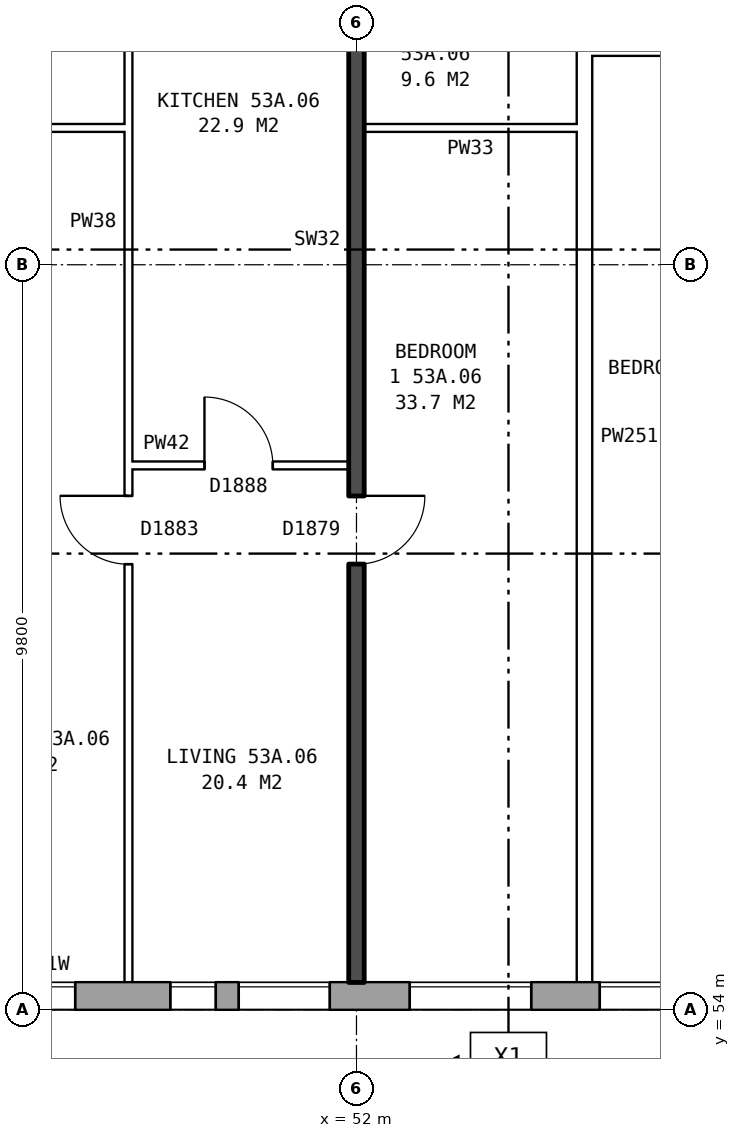
"""IFC4 building model, lengths in metres.
Left out: names, types, materials, properties, quantities, classifications, styles, units other than length and angle.
Written with IfcOpenShell. Run it as: python <this file> out.ifc"""

import sys

from ifc_helpers import new_model, si_unit, direction, frame, frame_2d, origin, place, context, subcontext, project, spatial, rectangle, extrude, element, fill, save


model = new_model("IFC4")
c1 = context("Model", 3, precision=1e-05, world=origin(), true_north=direction((0.0, 1.0)))
c2 = subcontext(c1, "Body", "Model", "MODEL_VIEW")
j1 = project(units=[si_unit("LENGTHUNIT", "METRE"), si_unit("PLANEANGLEUNIT", "RADIAN")], contexts=[c1])
p1 = place(None, origin())
s1 = spatial("IfcSite", under=j1, at=p1, CompositionType="ELEMENT")
p2 = place(p1, origin())
s2 = spatial("IfcBuilding", under=s1, at=p2, CompositionType="ELEMENT")
p3 = place(p2, frame((0.0, 0.0, 188.2)))
s3 = spatial("IfcBuildingStorey", under=s2, at=p3, CompositionType="ELEMENT", Elevation=188.2)
p4 = place(p3, frame((33.325, 54.18, 0.0), z_axis=(0.0, 0.0, 1.0), x_axis=(1.0, 0.0, 0.0)))
e1 = element("IfcWall", 1, at=p4, inside=s3, PredefinedType="STANDARD", context=c2, shape_type="SweptSolid", body=[
    extrude(rectangle(XDim=39.601, YDim=0.36, at=frame_2d((19.8, 0.0))), origin(), (0.0, 0.0, 1.0), 2.85),
])
p5 = place(p4, frame((1.375, 0.0, 0.8)))
e2 = element("IfcOpeningElement", 2, at=p5, cuts=e1, PredefinedType="OPENING", context=c2, shape_type="SweptSolid", body=[
    extrude(rectangle(XDim=1.6, YDim=1.8, at=frame_2d((0.8, 0.9))), frame((0.0, 0.19, 0.0), z_axis=(0.0, -1.0, 0.0), x_axis=(1.0, 0.0, 0.0)), (0.0, 0.0, 1.0), 0.38),
])
p6 = place(p4, frame((4.375, 0.0, 0.8)))
e3 = element("IfcOpeningElement", 3, at=p6, cuts=e1, PredefinedType="OPENING", context=c2, shape_type="SweptSolid", body=[
    extrude(rectangle(XDim=1.6, YDim=1.8, at=frame_2d((0.8, 0.9))), frame((0.0, 0.19, 0.0), z_axis=(0.0, -1.0, 0.0), x_axis=(1.0, 0.0, 0.0)), (0.0, 0.0, 1.0), 0.38),
])
p7 = place(p4, frame((7.375, 0.0, 0.8)))
e4 = element("IfcOpeningElement", 4, at=p7, cuts=e1, PredefinedType="OPENING", context=c2, shape_type="SweptSolid", body=[
    extrude(rectangle(XDim=1.6, YDim=1.8, at=frame_2d((0.8, 0.9))), frame((0.0, 0.19, 0.0), z_axis=(0.0, -1.0, 0.0), x_axis=(1.0, 0.0, 0.0)), (0.0, 0.0, 1.0), 0.38),
])
p8 = place(p4, frame((10.375, 0.0, 0.8)))
e5 = element("IfcOpeningElement", 5, at=p8, cuts=e1, PredefinedType="OPENING", context=c2, shape_type="SweptSolid", body=[
    extrude(rectangle(XDim=1.6, YDim=1.8, at=frame_2d((0.8, 0.9))), frame((0.0, 0.19, 0.0), z_axis=(0.0, -1.0, 0.0), x_axis=(1.0, 0.0, 0.0)), (0.0, 0.0, 1.0), 0.38),
])
p9 = place(p4, frame((12.875, 0.0, 0.8)))
e6 = element("IfcOpeningElement", 6, at=p9, cuts=e1, PredefinedType="OPENING", context=c2, shape_type="SweptSolid", body=[
    extrude(rectangle(XDim=1.2, YDim=1.8, at=frame_2d((0.6, 0.9))), frame((0.0, 0.19, 0.0), z_axis=(0.0, -1.0, 0.0), x_axis=(1.0, 0.0, 0.0)), (0.0, 0.0, 1.0), 0.38),
])
p10 = place(p4, frame((16.225, 0.0, 0.8)))
e7 = element("IfcOpeningElement", 7, at=p10, cuts=e1, PredefinedType="OPENING", context=c2, shape_type="SweptSolid", body=[
    extrude(rectangle(XDim=0.6, YDim=0.9, at=frame_2d((0.3, 0.45))), frame((0.0, 0.19, 0.0), z_axis=(0.0, -1.0, 0.0), x_axis=(1.0, 0.0, 0.0)), (0.0, 0.0, 1.0), 0.38),
])
p11 = place(p4, frame((19.375, 0.0, 0.8)))
e8 = element("IfcOpeningElement", 8, at=p11, cuts=e1, PredefinedType="OPENING", context=c2, shape_type="SweptSolid", body=[
    extrude(rectangle(XDim=1.6, YDim=1.8, at=frame_2d((0.8, 0.9))), frame((0.0, 0.19, 0.0), z_axis=(0.0, -1.0, 0.0), x_axis=(1.0, 0.0, 0.0)), (0.0, 0.0, 1.0), 0.38),
])
p12 = place(p4, frame((21.875, 0.0, 0.15)))
e9 = element("IfcOpeningElement", 9, at=p12, cuts=e1, PredefinedType="OPENING", context=c2, shape_type="SweptSolid", body=[
    extrude(rectangle(XDim=1.2, YDim=1.8, at=frame_2d((0.6, 0.9))), frame((0.0, 0.19, 0.0), z_axis=(0.0, -1.0, 0.0), x_axis=(1.0, 0.0, 0.0)), (0.0, 0.0, 1.0), 0.38),
])
p13 = place(p4, frame((25.375, 0.0, 0.8)))
e10 = element("IfcOpeningElement", 10, at=p13, cuts=e1, PredefinedType="OPENING", context=c2, shape_type="SweptSolid", body=[
    extrude(rectangle(XDim=1.6, YDim=1.8, at=frame_2d((0.8, 0.9))), frame((0.0, 0.19, 0.0), z_axis=(0.0, -1.0, 0.0), x_axis=(1.0, 0.0, 0.0)), (0.0, 0.0, 1.0), 0.38),
])
p14 = place(p4, frame((28.375, 0.0, 0.8)))
e11 = element("IfcOpeningElement", 11, at=p14, cuts=e1, PredefinedType="OPENING", context=c2, shape_type="SweptSolid", body=[
    extrude(rectangle(XDim=1.6, YDim=1.8, at=frame_2d((0.8, 0.9))), frame((0.0, 0.19, 0.0), z_axis=(0.0, -1.0, 0.0), x_axis=(1.0, 0.0, 0.0)), (0.0, 0.0, 1.0), 0.38),
])
p15 = place(p4, frame((31.375, 0.0, 0.8)))
e12 = element("IfcOpeningElement", 12, at=p15, cuts=e1, PredefinedType="OPENING", context=c2, shape_type="SweptSolid", body=[
    extrude(rectangle(XDim=1.6, YDim=1.8, at=frame_2d((0.8, 0.9))), frame((0.0, 0.19, 0.0), z_axis=(0.0, -1.0, 0.0), x_axis=(1.0, 0.0, 0.0)), (0.0, 0.0, 1.0), 0.38),
])
p16 = place(p4, frame((34.375, 0.0, 0.8)))
e13 = element("IfcOpeningElement", 13, at=p16, cuts=e1, PredefinedType="OPENING", context=c2, shape_type="SweptSolid", body=[
    extrude(rectangle(XDim=1.6, YDim=1.8, at=frame_2d((0.8, 0.9))), frame((0.0, 0.19, 0.0), z_axis=(0.0, -1.0, 0.0), x_axis=(1.0, 0.0, 0.0)), (0.0, 0.0, 1.0), 0.38),
])
p17 = place(p4, frame((37.375, 0.0, 0.8)))
e14 = element("IfcOpeningElement", 14, at=p17, cuts=e1, PredefinedType="OPENING", context=c2, shape_type="SweptSolid", body=[
    extrude(rectangle(XDim=1.6, YDim=1.8, at=frame_2d((0.8, 0.9))), frame((0.0, 0.19, 0.0), z_axis=(0.0, -1.0, 0.0), x_axis=(1.0, 0.0, 0.0)), (0.0, 0.0, 1.0), 0.38),
])
p18 = place(p4, frame((14.375, 0.0, 1.6)))
e15 = element("IfcOpeningElement", 15, at=p18, cuts=e1, PredefinedType="OPENING", context=c2, shape_type="SweptSolid", body=[
    extrude(rectangle(XDim=0.6, YDim=0.9, at=frame_2d((0.3, 0.45))), frame((0.0, 0.19, 0.0), z_axis=(0.0, -1.0, 0.0), x_axis=(1.0, 0.0, 0.0)), (0.0, 0.0, 1.0), 0.38),
])
p19 = place(p4, frame((17.125, 0.0, 0.8)))
e16 = element("IfcOpeningElement", 16, at=p19, cuts=e1, PredefinedType="OPENING", context=c2, shape_type="SweptSolid", body=[
    extrude(rectangle(XDim=1.2, YDim=1.8, at=frame_2d((0.6, 0.9))), frame((0.0, 0.19, 0.0), z_axis=(0.0, -1.0, 0.0), x_axis=(1.0, 0.0, 0.0)), (0.0, 0.0, 1.0), 0.38),
])
p20 = place(p4, frame((23.375, 0.0, 0.15)))
e17 = element("IfcOpeningElement", 17, at=p20, cuts=e1, PredefinedType="OPENING", context=c2, shape_type="SweptSolid", body=[
    extrude(rectangle(XDim=0.6, YDim=0.9, at=frame_2d((0.3, 0.45))), frame((0.0, 0.19, 0.0), z_axis=(0.0, -1.0, 0.0), x_axis=(1.0, 0.0, 0.0)), (0.0, 0.0, 1.0), 0.38),
])
p21 = place(p3, frame((49.0, 61.16, 0.0), z_axis=(0.0, 0.0, 1.0), x_axis=(1.0, 0.0, 0.0)))
e18 = element("IfcWall", 18, at=p21, inside=s3, PredefinedType="PARTITIONING", context=c2, shape_type="SweptSolid", body=[
    extrude(rectangle(XDim=2.9, YDim=0.1, at=frame_2d((1.45, 0.0))), origin(), (0.0, 0.0, 1.0), 2.85),
])
p22 = place(p21, frame((1.0, 0.0, 0.0)))
e19 = element("IfcOpeningElement", 19, at=p22, cuts=e18, PredefinedType="OPENING", context=c2, shape_type="SweptSolid", body=[
    extrude(rectangle(XDim=0.9, YDim=2.1, at=frame_2d((0.45, 1.05))), frame((0.0, 0.06, 0.0), z_axis=(0.0, -1.0, 0.0), x_axis=(1.0, 0.0, 0.0)), (0.0, 0.0, 1.0), 0.12),
])
p23 = place(p3, frame((46.1, 65.6, 0.0), z_axis=(0.0, 0.0, 1.0), x_axis=(1.0, 0.0, 0.0)))
e20 = element("IfcWall", 20, at=p23, inside=s3, PredefinedType="PARTITIONING", context=c2, shape_type="SweptSolid", body=[
    extrude(rectangle(XDim=2.9, YDim=0.1, at=frame_2d((1.45, 0.0))), origin(), (0.0, 0.0, 1.0), 2.85),
])
for number, where, z_axis, x_axis in (
    (21, (52.1, 65.6, 0.0), (0.0, 0.0, 1.0), (1.0, 0.0, 0.0)),
    (22, (55.1, 66.6, 0.0), (0.0, 0.0, 1.0), (1.0, 0.0, 0.0)),
):
    element("IfcWall", number, at=place(p3, frame(where, z_axis=z_axis, x_axis=x_axis)), inside=s3, PredefinedType="PARTITIONING", context=c2, shape_type="SweptSolid", body=[
        extrude(rectangle(XDim=2.8, YDim=0.1, at=frame_2d((1.4, 0.0))), origin(), (0.0, 0.0, 1.0), 2.85),
    ])
p24 = place(p3, frame((49.0, 54.36, 0.0), z_axis=(0.0, 0.0, 1.0), x_axis=(0.0, 1.0, 0.0)))
e23 = element("IfcWall", 23, at=p24, inside=s3, PredefinedType="PARTITIONING", context=c2, shape_type="SweptSolid", body=[
    extrude(rectangle(XDim=14.34, YDim=0.1, at=frame_2d((7.17, 0.0))), origin(), (0.0, 0.0, 1.0), 2.85),
])
p25 = place(p24, frame((5.5, 0.0, 0.0)))
e24 = element("IfcOpeningElement", 24, at=p25, cuts=e23, PredefinedType="OPENING", context=c2, shape_type="SweptSolid", body=[
    extrude(rectangle(XDim=0.9, YDim=2.1, at=frame_2d((0.45, 1.05))), frame((0.0, 0.06, 0.0), z_axis=(0.0, -1.0, 0.0), x_axis=(1.0, 0.0, 0.0)), (0.0, 0.0, 1.0), 0.12),
])
p26 = place(p24, frame((13.04, 0.0, 0.0)))
e25 = element("IfcOpeningElement", 25, at=p26, cuts=e23, PredefinedType="OPENING", context=c2, shape_type="SweptSolid", body=[
    extrude(rectangle(XDim=0.9, YDim=2.1, at=frame_2d((0.45, 1.05))), frame((0.0, 0.06, 0.0), z_axis=(0.0, -1.0, 0.0), x_axis=(1.0, 0.0, 0.0)), (0.0, 0.0, 1.0), 0.12),
])
p27 = place(p3, frame((52.0, 54.36, 0.0), z_axis=(0.0, 0.0, 1.0), x_axis=(0.0, 1.0, 0.0)))
e26 = element("IfcWall", 26, at=p27, inside=s3, PredefinedType="SOLIDWALL", context=c2, shape_type="SweptSolid", body=[
    extrude(rectangle(XDim=14.44, YDim=0.2, at=frame_2d((7.22, 0.0))), origin(), (0.0, 0.0, 1.0), 2.85),
])
p28 = place(p27, frame((5.5, 0.0, 0.0)))
e27 = element("IfcOpeningElement", 27, at=p28, cuts=e26, PredefinedType="OPENING", context=c2, shape_type="SweptSolid", body=[
    extrude(rectangle(XDim=0.9, YDim=2.1, at=frame_2d((0.45, 1.05))), frame((0.0, 0.11, 0.0), z_axis=(0.0, -1.0, 0.0), x_axis=(1.0, 0.0, 0.0)), (0.0, 0.0, 1.0), 0.22),
])
p29 = place(p27, frame((13.14, 0.0, 0.0)))
e28 = element("IfcOpeningElement", 28, at=p29, cuts=e26, PredefinedType="OPENING", context=c2, shape_type="SweptSolid", body=[
    extrude(rectangle(XDim=0.9, YDim=2.1, at=frame_2d((0.45, 1.05))), frame((0.0, 0.11, 0.0), z_axis=(0.0, -1.0, 0.0), x_axis=(1.0, 0.0, 0.0)), (0.0, 0.0, 1.0), 0.22),
])
p30 = place(p3, frame((55.0, 54.36, 0.0), z_axis=(0.0, 0.0, 1.0), x_axis=(0.0, 1.0, 0.0)))
e29 = element("IfcWall", 29, at=p30, inside=s3, PredefinedType="PARTITIONING", context=c2, shape_type="SweptSolid", body=[
    extrude(rectangle(XDim=14.34, YDim=0.2, at=frame_2d((7.17, 0.0))), origin(), (0.0, 0.0, 1.0), 2.85),
])
p31 = place(p10, origin())
e30 = element("IfcWindow", 30, at=p31, inside=s3, PartitioningType="SINGLE_PANEL", PredefinedType="WINDOW", context=c2, shape_type="SweptSolid", body=[
    extrude(rectangle(XDim=0.6, YDim=0.9, at=frame_2d((0.3, 0.45))), frame((0.0, 0.15, 0.0), z_axis=(0.0, -1.0, 0.0), x_axis=(1.0, 0.0, 0.0)), (0.0, 0.0, 1.0), 0.06),
])
fill(e7, e30)
p32 = place(p11, origin())
e31 = element("IfcWindow", 31, at=p32, inside=s3, PartitioningType="SINGLE_PANEL", PredefinedType="WINDOW", context=c2, shape_type="SweptSolid", body=[
    extrude(rectangle(XDim=1.6, YDim=1.8, at=frame_2d((0.8, 0.9))), frame((0.0, 0.15, 0.0), z_axis=(0.0, -1.0, 0.0), x_axis=(1.0, 0.0, 0.0)), (0.0, 0.0, 1.0), 0.06),
])
fill(e8, e31)
p33 = place(p12, origin())
e32 = element("IfcWindow", 32, at=p33, inside=s3, PartitioningType="SINGLE_PANEL", PredefinedType="WINDOW", context=c2, shape_type="SweptSolid", body=[
    extrude(rectangle(XDim=1.2, YDim=1.8, at=frame_2d((0.6, 0.9))), frame((0.0, 0.15, 0.0), z_axis=(0.0, -1.0, 0.0), x_axis=(1.0, 0.0, 0.0)), (0.0, 0.0, 1.0), 0.06),
])
fill(e9, e32)
p34 = place(p28, frame((0.9, 0.0, 0.0), z_axis=(0.0, 0.0, 1.0), x_axis=(-1.0, 0.0, 0.0)))
e33 = element("IfcDoor", 33, at=p34, inside=s3, OperationType="SINGLE_SWING_LEFT", PredefinedType="DOOR", context=c2, shape_type="SweptSolid", body=[
    extrude(rectangle(XDim=0.9, YDim=2.1, at=frame_2d((0.45, 1.05))), frame((0.0, 0.025, 0.0), z_axis=(0.0, -1.0, 0.0), x_axis=(1.0, 0.0, 0.0)), (0.0, 0.0, 1.0), 0.05),
])
fill(e27, e33)
p35 = place(p25, origin())
e34 = element("IfcDoor", 34, at=p35, inside=s3, OperationType="SINGLE_SWING_RIGHT", PredefinedType="DOOR", context=c2, shape_type="SweptSolid", body=[
    extrude(rectangle(XDim=0.9, YDim=2.1, at=frame_2d((0.45, 1.05))), frame((0.0, 0.025, 0.0), z_axis=(0.0, -1.0, 0.0), x_axis=(1.0, 0.0, 0.0)), (0.0, 0.0, 1.0), 0.05),
])
fill(e24, e34)
p36 = place(p22, origin())
e35 = element("IfcDoor", 35, at=p36, inside=s3, OperationType="SINGLE_SWING_LEFT", PredefinedType="DOOR", context=c2, shape_type="SweptSolid", body=[
    extrude(rectangle(XDim=0.9, YDim=2.1, at=frame_2d((0.45, 1.05))), frame((0.0, 0.025, 0.0), z_axis=(0.0, -1.0, 0.0), x_axis=(1.0, 0.0, 0.0)), (0.0, 0.0, 1.0), 0.05),
])
fill(e19, e35)
p37 = place(p18, origin())
e36 = element("IfcWindow", 36, at=p37, inside=s3, PartitioningType="SINGLE_PANEL", PredefinedType="WINDOW", context=c2, shape_type="SweptSolid", body=[
    extrude(rectangle(XDim=0.6, YDim=0.9, at=frame_2d((0.3, 0.45))), frame((0.0, 0.15, 0.0), z_axis=(0.0, -1.0, 0.0), x_axis=(1.0, 0.0, 0.0)), (0.0, 0.0, 1.0), 0.06),
])
fill(e15, e36)
p38 = place(p19, origin())
e37 = element("IfcWindow", 37, at=p38, inside=s3, PartitioningType="SINGLE_PANEL", PredefinedType="WINDOW", context=c2, shape_type="SweptSolid", body=[
    extrude(rectangle(XDim=1.2, YDim=1.8, at=frame_2d((0.6, 0.9))), frame((0.0, 0.15, 0.0), z_axis=(0.0, -1.0, 0.0), x_axis=(1.0, 0.0, 0.0)), (0.0, 0.0, 1.0), 0.06),
])
fill(e16, e37)
save(model, sys.argv[1])
